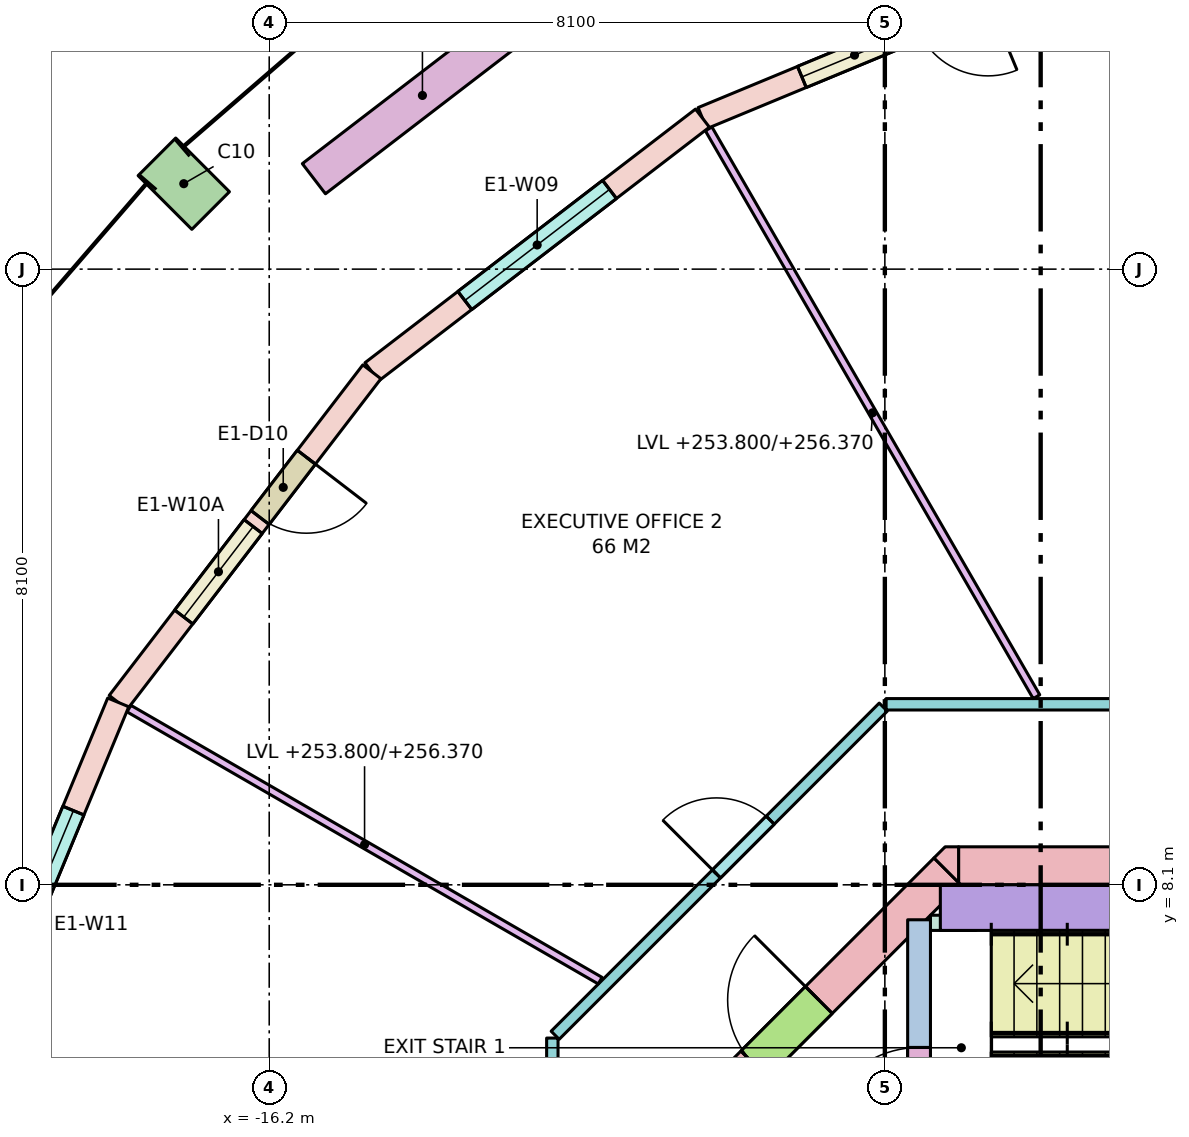
"""IFC4 building model, lengths in metres.
Left out: names, types, materials, properties, quantities, classifications, styles, units other than length and angle.
Written with IfcOpenShell. Run it as: python <this file> out.ifc"""

import sys

from ifc_helpers import new_model, si_unit, direction, frame, frame_2d, origin, origin_2d, place, context, subcontext, project, spatial, polyline, rectangle, outline, extrude, element, fill, save


model = new_model("IFC4")
c1 = context("Model", 3, precision=1e-05, world=origin(), true_north=direction((0.0, 1.0)))
c2 = subcontext(c1, "Body", "Model", "MODEL_VIEW")
j1 = project(units=[si_unit("LENGTHUNIT", "METRE"), si_unit("PLANEANGLEUNIT", "RADIAN")], contexts=[c1])
p1 = place(None, origin())
s1 = spatial("IfcSite", under=j1, at=p1, CompositionType="ELEMENT")
p2 = place(p1, origin())
s2 = spatial("IfcBuilding", under=s1, at=p2, CompositionType="ELEMENT")
p3 = place(p2, frame((0.0, 0.0, 253.8)))
s3 = spatial("IfcBuildingStorey", under=s2, at=p3, CompositionType="ELEMENT", Elevation=253.8)
p4 = place(p3, frame((-17.324, 17.324, 0.0), z_axis=(0.0, 0.0, 1.0), x_axis=(-0.707106781187, -0.707106781187, 0.0)))
e1 = element("IfcColumn", 1, at=p4, inside=s3, PredefinedType="COLUMN", context=c2, shape_type="SweptSolid", body=[
    extrude(rectangle(XDim=0.7, YDim=1.0, at=origin_2d()), origin(), (0.0, 0.0, 1.0), 3.7),
])
p5 = place(p3, frame((-7.13, 8.35, -0.28), z_axis=(0.0, 0.0, 1.0), x_axis=(1.0, 0.0, 0.0)))
e2 = element("IfcWall", 2, at=p5, inside=s3, PredefinedType="SHEAR", context=c2, shape_type="SweptSolid", body=[
    extrude(rectangle(XDim=14.26, YDim=0.5, at=frame_2d((7.13, 0.0))), origin(), (0.0, 0.0, 1.0), 3.7),
])
p6 = place(p5, frame((5.48, 0.0, 0.28)))
e3 = element("IfcOpeningElement", 3, at=p6, cuts=e2, PredefinedType="OPENING", context=c2, shape_type="SweptSolid", body=[
    extrude(rectangle(XDim=0.7, YDim=2.1, at=frame_2d((0.35, 1.05))), frame((0.0, 0.26, 0.0), z_axis=(0.0, -1.0, 0.0), x_axis=(1.0, 0.0, 0.0)), (0.0, 0.0, 1.0), 0.52),
])
p7 = place(p5, frame((6.53, 0.0, 0.28)))
e4 = element("IfcOpeningElement", 4, at=p7, cuts=e2, PredefinedType="OPENING", context=c2, shape_type="SweptSolid", body=[
    extrude(rectangle(XDim=0.85, YDim=2.1, at=frame_2d((0.425, 1.05))), frame((0.0, 0.26, 0.0), z_axis=(0.0, -1.0, 0.0), x_axis=(1.0, 0.0, 0.0)), (0.0, 0.0, 1.0), 0.52),
])
p8 = place(p5, frame((7.83, 0.0, 0.28)))
e5 = element("IfcOpeningElement", 5, at=p8, cuts=e2, PredefinedType="OPENING", context=c2, shape_type="SweptSolid", body=[
    extrude(rectangle(XDim=0.85, YDim=2.1, at=frame_2d((0.425, 1.05))), frame((0.0, 0.26, 0.0), z_axis=(0.0, -1.0, 0.0), x_axis=(1.0, 0.0, 0.0)), (0.0, 0.0, 1.0), 0.52),
])
p9 = place(p3, frame((-10.277, 5.277, -0.28), z_axis=(0.0, 0.0, 1.0), x_axis=(0.707106781187, 0.707106781187, 0.0)))
e6 = element("IfcWall", 6, at=p9, inside=s3, PredefinedType="SHEAR", context=c2, shape_type="SweptSolid", body=[
    extrude(rectangle(XDim=4.243, YDim=0.5, at=frame_2d((2.121, 0.0))), origin(), (0.0, 0.0, 1.0), 3.7),
])
p10 = place(p9, frame((0.65, 0.0, 0.28)))
e7 = element("IfcOpeningElement", 7, at=p10, cuts=e6, PredefinedType="OPENING", context=c2, shape_type="SweptSolid", body=[
    extrude(rectangle(XDim=1.2, YDim=2.1, at=frame_2d((0.6, 1.05))), frame((0.0, 0.26, 0.0), z_axis=(0.0, -1.0, 0.0), x_axis=(1.0, 0.0, 0.0)), (0.0, 0.0, 1.0), 0.52),
])
p11 = place(p3, frame((0.0, 0.0, -0.28)))
e8 = element("IfcWall", 8, at=p11, inside=s3, PredefinedType="SHEAR", context=c2, shape_type="SweptSolid", body=[
    extrude(outline(polyline([(-7.307, 8.6), (-7.13, 8.6), (-7.13, 8.13), (-7.454, 8.454), (-7.307, 8.6)])), origin(), (0.0, 0.0, 1.0), 3.7),
])
p12 = place(p3, frame((-7.65, 4.5, 0.0), z_axis=(0.0, 0.0, 1.0), x_axis=(0.0, 1.0, 0.0)))
e9 = element("IfcWall", 9, at=p12, inside=s3, PredefinedType="SHEAR", context=c2, shape_type="SweptSolid", body=[
    extrude(rectangle(XDim=3.14, YDim=0.3, at=frame_2d((1.57, 0.0))), origin(), (0.0, 0.0, 1.0), 3.42),
])
p13 = place(p12, frame((0.14, 0.0, 0.0)))
e10 = element("IfcOpeningElement", 10, at=p13, cuts=e9, PredefinedType="OPENING", context=c2, shape_type="SweptSolid", body=[
    extrude(rectangle(XDim=1.32, YDim=2.1, at=frame_2d((0.66, 1.05))), frame((0.0, 0.16, 0.0), z_axis=(0.0, -1.0, 0.0), x_axis=(1.0, 0.0, 0.0)), (0.0, 0.0, 1.0), 0.32),
])
p14 = place(p3, frame((-7.37, 7.8, 0.0), z_axis=(0.0, 0.0, 1.0), x_axis=(1.0, 0.0, 0.0)))
e11 = element("IfcWall", 11, at=p14, inside=s3, PredefinedType="SHEAR", context=c2, shape_type="SweptSolid", body=[
    extrude(rectangle(XDim=5.37, YDim=0.6, at=frame_2d((2.685, 0.0))), origin(), (0.0, 0.0, 1.0), 3.42),
])
p15 = place(p3, frame((-7.5, 7.6, 0.0), z_axis=(0.0, 0.0, 1.0), x_axis=(1.0, 0.0, 0.0)))
e12 = element("IfcWall", 12, at=p15, inside=s3, PredefinedType="SHEAR", context=c2, shape_type="SweptSolid", body=[
    extrude(rectangle(XDim=0.6, YDim=0.2, at=frame_2d((0.3, 0.0))), origin(), (0.0, 0.0, 1.0), 3.42),
])
p16 = place(p3, frame((-5.435, 20.284, 0.0), z_axis=(0.0, 0.0, 1.0), x_axis=(-0.923877333662, -0.382688740813, 0.0)))
e13 = element("IfcWall", 13, at=p16, inside=s3, PredefinedType="STANDARD", context=c2, shape_type="SweptSolid", body=[
    extrude(rectangle(XDim=5.482, YDim=0.3, at=frame_2d((2.741, 0.0))), origin(), (0.0, 0.0, 1.0), 3.42),
])
p17 = place(p16, frame((1.416, 0.0, 0.0)))
e14 = element("IfcOpeningElement", 14, at=p17, cuts=e13, PredefinedType="OPENING", context=c2, shape_type="SweptSolid", body=[
    extrude(rectangle(XDim=1.0, YDim=2.4, at=frame_2d((0.5, 1.2))), frame((0.0, 0.16, 0.0), z_axis=(0.0, -1.0, 0.0), x_axis=(1.0, 0.0, 0.0)), (0.0, 0.0, 1.0), 0.32),
])
p18 = place(p16, frame((2.566, 0.0, 0.8)))
e15 = element("IfcOpeningElement", 15, at=p18, cuts=e13, PredefinedType="OPENING", context=c2, shape_type="SweptSolid", body=[
    extrude(rectangle(XDim=1.5, YDim=2.4, at=frame_2d((0.75, 1.2))), frame((0.0, 0.16, 0.0), z_axis=(0.0, -1.0, 0.0), x_axis=(1.0, 0.0, 0.0)), (0.0, 0.0, 1.0), 0.32),
])
p19 = place(p3, frame((-10.5, 18.187, 0.0), z_axis=(0.0, 0.0, 1.0), x_axis=(-0.793335336593, -0.608784891166, 0.0)))
e16 = element("IfcWall", 16, at=p19, inside=s3, PredefinedType="STANDARD", context=c2, shape_type="SweptSolid", body=[
    extrude(rectangle(XDim=5.482, YDim=0.3, at=frame_2d((2.741, 0.0))), origin(), (0.0, 0.0, 1.0), 3.42),
])
p20 = place(p19, frame((1.541, 0.0, 0.8)))
e17 = element("IfcOpeningElement", 17, at=p20, cuts=e16, PredefinedType="OPENING", context=c2, shape_type="SweptSolid", body=[
    extrude(rectangle(XDim=2.4, YDim=2.4, at=frame_2d((1.2, 1.2))), frame((0.0, 0.16, 0.0), z_axis=(0.0, -1.0, 0.0), x_axis=(1.0, 0.0, 0.0)), (0.0, 0.0, 1.0), 0.32),
])
p21 = place(p3, frame((-14.849, 14.849, 0.0), z_axis=(0.0, 0.0, 1.0), x_axis=(-0.608784891166, -0.793335336593, 0.0)))
e18 = element("IfcWall", 18, at=p21, inside=s3, PredefinedType="STANDARD", context=c2, shape_type="SweptSolid", body=[
    extrude(rectangle(XDim=5.482, YDim=0.3, at=frame_2d((2.741, 0.0))), origin(), (0.0, 0.0, 1.0), 3.42),
])
p22 = place(p21, frame((1.416, 0.0, 0.0)))
e19 = element("IfcOpeningElement", 19, at=p22, cuts=e18, PredefinedType="OPENING", context=c2, shape_type="SweptSolid", body=[
    extrude(rectangle(XDim=1.0, YDim=2.4, at=frame_2d((0.5, 1.2))), frame((0.0, 0.16, 0.0), z_axis=(0.0, -1.0, 0.0), x_axis=(1.0, 0.0, 0.0)), (0.0, 0.0, 1.0), 0.32),
])
p23 = place(p21, frame((2.566, 0.0, 0.8)))
e20 = element("IfcOpeningElement", 20, at=p23, cuts=e18, PredefinedType="OPENING", context=c2, shape_type="SweptSolid", body=[
    extrude(rectangle(XDim=1.5, YDim=2.4, at=frame_2d((0.75, 1.2))), frame((0.0, 0.16, 0.0), z_axis=(0.0, -1.0, 0.0), x_axis=(1.0, 0.0, 0.0)), (0.0, 0.0, 1.0), 0.32),
])
p24 = place(p3, frame((-18.187, 10.5, 0.0), z_axis=(0.0, 0.0, 1.0), x_axis=(-0.382688740813, -0.923877333662, 0.0)))
e21 = element("IfcWall", 21, at=p24, inside=s3, PredefinedType="STANDARD", context=c2, shape_type="SweptSolid", body=[
    extrude(rectangle(XDim=5.482, YDim=0.3, at=frame_2d((2.741, 0.0))), origin(), (0.0, 0.0, 1.0), 3.42),
])
p25 = place(p24, frame((1.541, 0.0, 0.8)))
e22 = element("IfcOpeningElement", 22, at=p25, cuts=e21, PredefinedType="OPENING", context=c2, shape_type="SweptSolid", body=[
    extrude(rectangle(XDim=2.4, YDim=2.4, at=frame_2d((1.2, 1.2))), frame((0.0, 0.16, 0.0), z_axis=(0.0, -1.0, 0.0), x_axis=(1.0, 0.0, 0.0)), (0.0, 0.0, 1.0), 0.32),
])
p26 = place(p3, frame((-12.756, 19.581, 0.0), z_axis=(0.0, 0.0, 1.0), x_axis=(-0.793384730612, -0.608720518162, 0.0)))
e23 = element("IfcWall", 23, at=p26, inside=s3, PredefinedType="PARAPET", context=c2, shape_type="SweptSolid", body=[
    extrude(rectangle(XDim=3.6, YDim=0.5, at=frame_2d((1.8, 0.0))), origin(), (0.0, 0.0, 1.0), 0.9),
])
p27 = place(p3, frame((-12.475, -6.084, 0.0), z_axis=(0.0, 0.0, 1.0), x_axis=(0.0, 1.0, 0.0)))
e24 = element("IfcWall", 24, at=p27, inside=s3, PredefinedType="PARTITIONING", context=c2, shape_type="SweptSolid", body=[
    extrude(rectangle(XDim=12.167, YDim=0.15, at=frame_2d((6.084, 0.0))), origin(), (0.0, 0.0, 1.0), 2.57),
])
p28 = place(p27, frame((6.928, 0.0, 0.0)))
e25 = element("IfcOpeningElement", 25, at=p28, cuts=e24, PredefinedType="OPENING", context=c2, shape_type="SweptSolid", body=[
    extrude(rectangle(XDim=1.0, YDim=2.1, at=frame_2d((0.5, 1.05))), frame((0.0, 0.085, 0.0), z_axis=(0.0, -1.0, 0.0), x_axis=(1.0, 0.0, 0.0)), (0.0, 0.0, 1.0), 0.17),
])
p29 = place(p27, frame((0.896, 0.0, 0.0)))
e26 = element("IfcOpeningElement", 26, at=p29, cuts=e24, PredefinedType="OPENING", context=c2, shape_type="SweptSolid", body=[
    extrude(rectangle(XDim=1.0, YDim=2.1, at=frame_2d((0.5, 1.05))), frame((0.0, 0.085, 0.0), z_axis=(0.0, -1.0, 0.0), x_axis=(1.0, 0.0, 0.0)), (0.0, 0.0, 1.0), 0.17),
])
p30 = place(p3, frame((-12.438, 6.121, 0.0), z_axis=(0.0, 0.0, 1.0), x_axis=(0.707106781187, 0.707106781187, 0.0)))
e27 = element("IfcWall", 27, at=p30, inside=s3, PredefinedType="PARTITIONING", context=c2, shape_type="SweptSolid", body=[
    extrude(rectangle(XDim=6.105, YDim=0.15, at=frame_2d((3.053, 0.0))), origin(), (0.0, 0.0, 1.0), 2.57),
])
p31 = place(p30, frame((3.002, 0.0, 0.0)))
e28 = element("IfcOpeningElement", 28, at=p31, cuts=e27, PredefinedType="OPENING", context=c2, shape_type="SweptSolid", body=[
    extrude(rectangle(XDim=1.0, YDim=2.1, at=frame_2d((0.5, 1.05))), frame((0.0, 0.085, 0.0), z_axis=(0.0, -1.0, 0.0), x_axis=(1.0, 0.0, 0.0)), (0.0, 0.0, 1.0), 0.17),
])
p32 = place(p3, frame((-8.084, 10.475, 0.0), z_axis=(0.0, 0.0, 1.0), x_axis=(1.0, 0.0, 0.0)))
e29 = element("IfcWall", 29, at=p32, inside=s3, PredefinedType="PARTITIONING", context=c2, shape_type="SweptSolid", body=[
    extrude(rectangle(XDim=16.167, YDim=0.15, at=frame_2d((8.084, 0.0))), origin(), (0.0, 0.0, 1.0), 2.57),
])
p33 = place(p32, frame((13.004, 0.0, 0.0)))
e30 = element("IfcOpeningElement", 30, at=p33, cuts=e29, PredefinedType="OPENING", context=c2, shape_type="SweptSolid", body=[
    extrude(rectangle(XDim=1.0, YDim=2.1, at=frame_2d((0.5, 1.05))), frame((0.0, 0.085, 0.0), z_axis=(0.0, -1.0, 0.0), x_axis=(1.0, 0.0, 0.0)), (0.0, 0.0, 1.0), 0.17),
])
p34 = place(p32, frame((9.038, 0.0, 0.0)))
e31 = element("IfcOpeningElement", 31, at=p34, cuts=e29, PredefinedType="OPENING", context=c2, shape_type="SweptSolid", body=[
    extrude(rectangle(XDim=0.9, YDim=2.1, at=frame_2d((0.45, 1.05))), frame((0.0, 0.085, 0.0), z_axis=(0.0, -1.0, 0.0), x_axis=(1.0, 0.0, 0.0)), (0.0, 0.0, 1.0), 0.17),
])
p35 = place(p32, frame((4.556, 0.0, 0.0)))
e32 = element("IfcOpeningElement", 32, at=p35, cuts=e29, PredefinedType="OPENING", context=c2, shape_type="SweptSolid", body=[
    extrude(rectangle(XDim=1.0, YDim=2.1, at=frame_2d((0.5, 1.05))), frame((0.0, 0.085, 0.0), z_axis=(0.0, -1.0, 0.0), x_axis=(1.0, 0.0, 0.0)), (0.0, 0.0, 1.0), 0.17),
])
p36 = place(p3, frame((-6.105, 10.575, 0.0), z_axis=(0.0, 0.0, 1.0), x_axis=(-0.50001399067, 0.866017326117, 0.0)))
e33 = element("IfcWall", 33, at=p36, inside=s3, PredefinedType="PARTITIONING", context=c2, shape_type="SweptSolid", body=[
    extrude(rectangle(XDim=8.626, YDim=0.1, at=frame_2d((4.313, 0.0))), origin(), (0.0, 0.0, 1.0), 2.57),
])
p37 = place(p3, frame((-11.846, 6.839, 0.0), z_axis=(0.0, 0.0, 1.0), x_axis=(-0.866011787705, 0.500023583, 0.0)))
e34 = element("IfcWall", 34, at=p37, inside=s3, PredefinedType="PARTITIONING", context=c2, shape_type="SweptSolid", body=[
    extrude(rectangle(XDim=7.158, YDim=0.1, at=frame_2d((3.579, 0.0))), origin(), (0.0, 0.0, 1.0), 2.57),
])
p38 = place(p18, origin())
e35 = element("IfcWindow", 35, at=p38, inside=s3, PartitioningType="SINGLE_PANEL", PredefinedType="WINDOW", context=c2, shape_type="SweptSolid", body=[
    extrude(rectangle(XDim=1.5, YDim=2.4, at=frame_2d((0.75, 1.2))), frame((0.0, 0.03, 0.0), z_axis=(0.0, -1.0, 0.0), x_axis=(1.0, 0.0, 0.0)), (0.0, 0.0, 1.0), 0.06),
])
fill(e15, e35)
p39 = place(p20, origin())
e36 = element("IfcWindow", 36, at=p39, inside=s3, PartitioningType="SINGLE_PANEL", PredefinedType="WINDOW", context=c2, shape_type="SweptSolid", body=[
    extrude(rectangle(XDim=2.4, YDim=2.4, at=frame_2d((1.2, 1.2))), frame((0.0, 0.03, 0.0), z_axis=(0.0, -1.0, 0.0), x_axis=(1.0, 0.0, 0.0)), (0.0, 0.0, 1.0), 0.06),
])
fill(e17, e36)
p40 = place(p22, origin())
e37 = element("IfcDoor", 37, at=p40, inside=s3, OperationType="SINGLE_SWING_LEFT", PredefinedType="DOOR", context=c2, shape_type="SweptSolid", body=[
    extrude(rectangle(XDim=1.0, YDim=2.4, at=frame_2d((0.5, 1.2))), frame((0.0, 0.025, 0.0), z_axis=(0.0, -1.0, 0.0), x_axis=(1.0, 0.0, 0.0)), (0.0, 0.0, 1.0), 0.05),
])
fill(e19, e37)
p41 = place(p23, origin())
e38 = element("IfcWindow", 38, at=p41, inside=s3, PartitioningType="SINGLE_PANEL", PredefinedType="WINDOW", context=c2, shape_type="SweptSolid", body=[
    extrude(rectangle(XDim=1.5, YDim=2.4, at=frame_2d((0.75, 1.2))), frame((0.0, 0.03, 0.0), z_axis=(0.0, -1.0, 0.0), x_axis=(1.0, 0.0, 0.0)), (0.0, 0.0, 1.0), 0.06),
])
fill(e20, e38)
p42 = place(p25, origin())
e39 = element("IfcWindow", 39, at=p42, inside=s3, PartitioningType="SINGLE_PANEL", PredefinedType="WINDOW", context=c2, shape_type="SweptSolid", body=[
    extrude(rectangle(XDim=2.4, YDim=2.4, at=frame_2d((1.2, 1.2))), frame((0.0, 0.03, 0.0), z_axis=(0.0, -1.0, 0.0), x_axis=(1.0, 0.0, 0.0)), (0.0, 0.0, 1.0), 0.06),
])
fill(e22, e39)
p43 = place(p13, origin())
e40 = element("IfcDoor", 40, at=p43, inside=s3, OperationType="DOUBLE_DOOR_SINGLE_SWING", PredefinedType="DOOR", context=c2, shape_type="SweptSolid", body=[
    extrude(rectangle(XDim=1.32, YDim=2.1, at=frame_2d((0.66, 1.05))), frame((0.0, 0.025, 0.0), z_axis=(0.0, -1.0, 0.0), x_axis=(1.0, 0.0, 0.0)), (0.0, 0.0, 1.0), 0.05),
])
fill(e10, e40)
p44 = place(p10, origin())
e41 = element("IfcDoor", 41, at=p44, inside=s3, OperationType="SINGLE_SWING_RIGHT", PredefinedType="DOOR", context=c2, shape_type="SweptSolid", body=[
    extrude(rectangle(XDim=1.2, YDim=2.1, at=frame_2d((0.6, 1.05))), frame((0.0, 0.025, 0.0), z_axis=(0.0, -1.0, 0.0), x_axis=(1.0, 0.0, 0.0)), (0.0, 0.0, 1.0), 0.05),
])
fill(e7, e41)
p45 = place(p31, origin())
e42 = element("IfcDoor", 42, at=p45, inside=s3, OperationType="SINGLE_SWING_LEFT", PredefinedType="DOOR", context=c2, shape_type="SweptSolid", body=[
    extrude(rectangle(XDim=1.0, YDim=2.1, at=frame_2d((0.5, 1.05))), frame((0.0, 0.025, 0.0), z_axis=(0.0, -1.0, 0.0), x_axis=(1.0, 0.0, 0.0)), (0.0, 0.0, 1.0), 0.05),
])
fill(e28, e42)
save(model, sys.argv[1])
